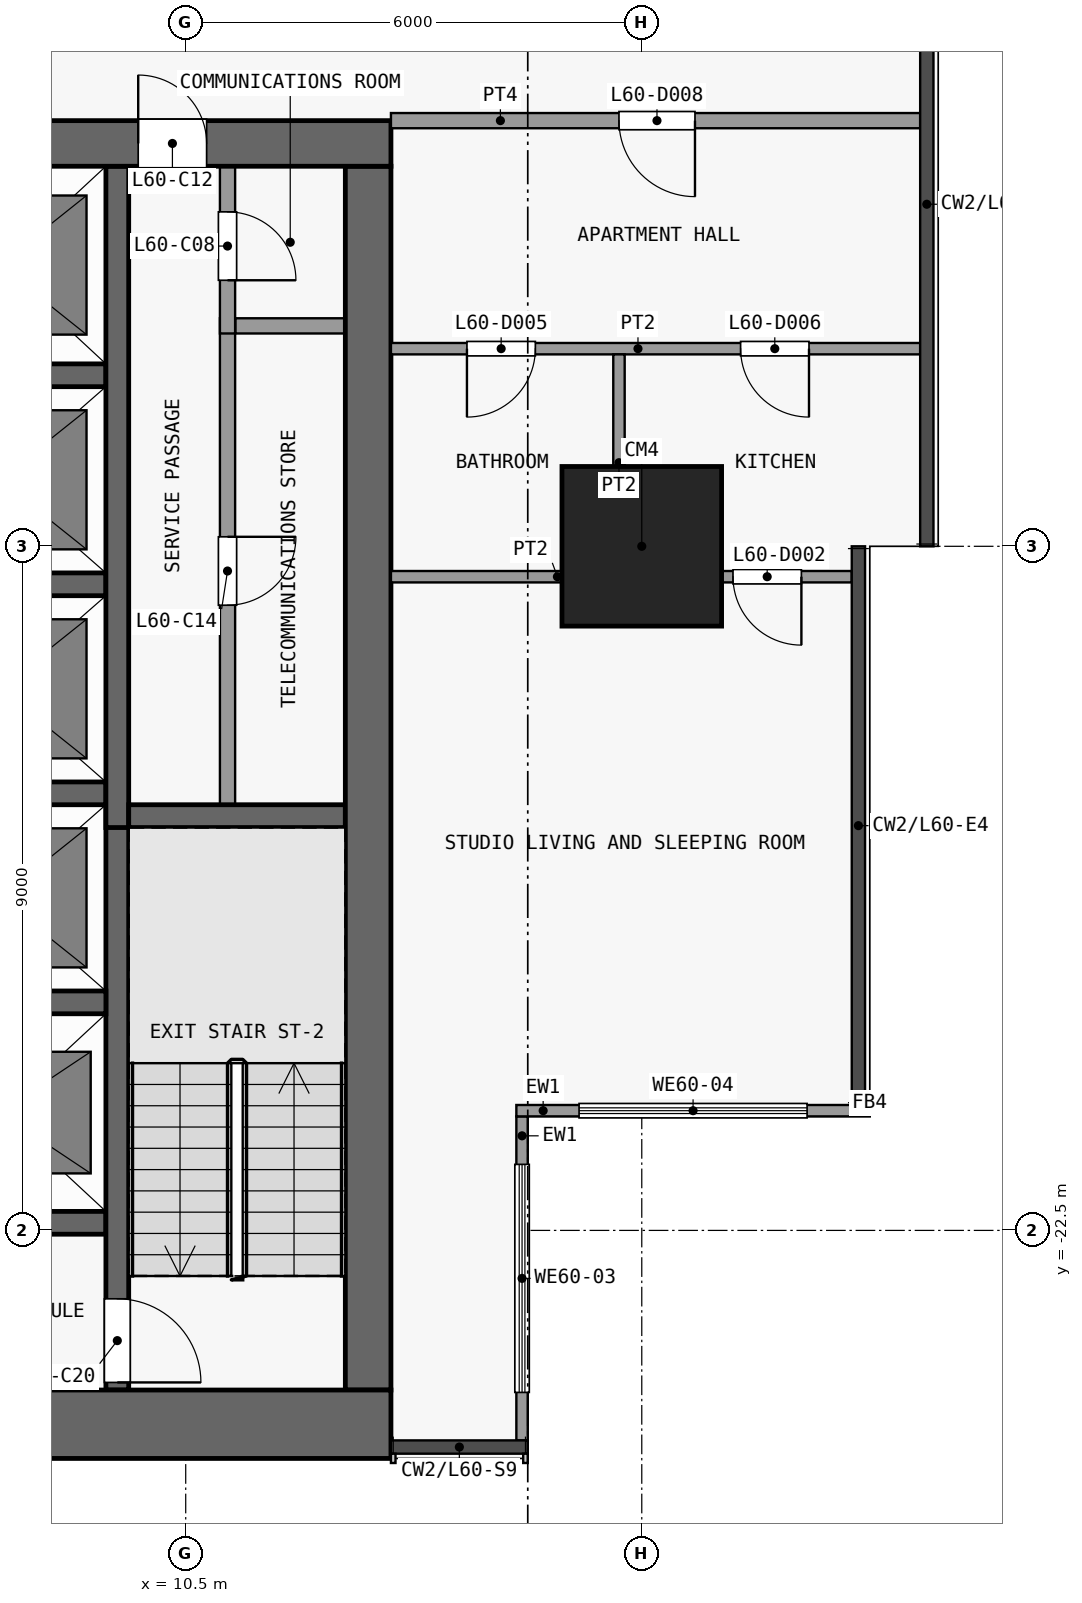
"""IFC4 building model, lengths in metres.
Left out: names, types, materials, properties, quantities, classifications, styles, units other than length and angle.
Written with IfcOpenShell. Run it as: python <this file> out.ifc"""

import sys

from ifc_helpers import new_model, si_unit, direction, frame, frame_2d, origin, origin_2d, place, context, subcontext, project, spatial, rectangle, extrude, element, fill, save


model = new_model("IFC4")
c1 = context("Model", 3, precision=1e-05, world=origin(), true_north=direction((0.0, 1.0)))
c2 = subcontext(c1, "Body", "Model", "MODEL_VIEW")
j1 = project(units=[si_unit("LENGTHUNIT", "METRE"), si_unit("PLANEANGLEUNIT", "RADIAN")], contexts=[c1])
p1 = place(None, origin())
s1 = spatial("IfcSite", under=j1, at=p1, CompositionType="ELEMENT")
p2 = place(p1, origin())
s2 = spatial("IfcBuilding", under=s1, at=p2, CompositionType="ELEMENT")
p3 = place(p2, frame((0.0, 0.0, 237.5)))
s3 = spatial("IfcBuildingStorey", under=s2, at=p3, CompositionType="ELEMENT", Elevation=237.5)
p4 = place(p3, frame((16.5, -13.5, 0.0), z_axis=(0.0, 0.0, 1.0), x_axis=(1.0, 0.0, 0.0)))
e1 = element("IfcColumn", 1, at=p4, inside=s3, PredefinedType="COLUMN", context=c2, shape_type="SweptSolid", body=[
    extrude(rectangle(XDim=2.1, YDim=2.1, at=origin_2d()), origin(), (0.0, 0.0, 1.0), 3.6),
])
p5 = place(p3, frame((-13.2, -25.05, 0.0), z_axis=(0.0, 0.0, 1.0), x_axis=(1.0, 0.0, 0.0)))
e2 = element("IfcWall", 2, at=p5, inside=s3, PredefinedType="SHEAR", context=c2, shape_type="SweptSolid", body=[
    extrude(rectangle(XDim=26.4, YDim=0.9, at=frame_2d((13.2, 0.0))), origin(), (0.0, 0.0, 1.0), 3.3),
])
p6 = place(p3, frame((-13.2, -8.2, 0.0), z_axis=(0.0, 0.0, 1.0), x_axis=(1.0, 0.0, 0.0)))
e3 = element("IfcWall", 3, at=p6, inside=s3, PredefinedType="SHEAR", context=c2, shape_type="SweptSolid", body=[
    extrude(rectangle(XDim=26.4, YDim=0.6, at=frame_2d((13.2, 0.0))), origin(), (0.0, 0.0, 1.0), 3.3),
])
p7 = place(p6, frame((7.5, 0.0, 0.0)))
e4 = element("IfcOpeningElement", 4, at=p7, cuts=e3, PredefinedType="OPENING", context=c2, shape_type="SweptSolid", body=[
    extrude(rectangle(XDim=1.8, YDim=2.1, at=frame_2d((0.9, 1.05))), frame((0.0, 0.31, 0.0), z_axis=(0.0, -1.0, 0.0), x_axis=(1.0, 0.0, 0.0)), (0.0, 0.0, 1.0), 0.62),
])
p8 = place(p6, frame((17.1, 0.0, 0.0)))
e5 = element("IfcOpeningElement", 5, at=p8, cuts=e3, PredefinedType="OPENING", context=c2, shape_type="SweptSolid", body=[
    extrude(rectangle(XDim=1.8, YDim=2.1, at=frame_2d((0.9, 1.05))), frame((0.0, 0.31, 0.0), z_axis=(0.0, -1.0, 0.0), x_axis=(1.0, 0.0, 0.0)), (0.0, 0.0, 1.0), 0.62),
])
p9 = place(p6, frame((2.425, 0.0, 0.0)))
e6 = element("IfcOpeningElement", 6, at=p9, cuts=e3, PredefinedType="OPENING", context=c2, shape_type="SweptSolid", body=[
    extrude(rectangle(XDim=0.9, YDim=2.1, at=frame_2d((0.45, 1.05))), frame((0.0, 0.31, 0.0), z_axis=(0.0, -1.0, 0.0), x_axis=(1.0, 0.0, 0.0)), (0.0, 0.0, 1.0), 0.62),
])
p10 = place(p6, frame((23.075, 0.0, 0.0)))
e7 = element("IfcOpeningElement", 7, at=p10, cuts=e3, PredefinedType="OPENING", context=c2, shape_type="SweptSolid", body=[
    extrude(rectangle(XDim=0.9, YDim=2.1, at=frame_2d((0.45, 1.05))), frame((0.0, 0.31, 0.0), z_axis=(0.0, -1.0, 0.0), x_axis=(1.0, 0.0, 0.0)), (0.0, 0.0, 1.0), 0.62),
])
p11 = place(p3, frame((12.9, -24.6, 0.0), z_axis=(0.0, 0.0, 1.0), x_axis=(0.0, 1.0, 0.0)))
e8 = element("IfcWall", 8, at=p11, inside=s3, PredefinedType="SHEAR", context=c2, shape_type="SweptSolid", body=[
    extrude(rectangle(XDim=16.1, YDim=0.6, at=frame_2d((8.05, 0.0))), origin(), (0.0, 0.0, 1.0), 3.3),
])
for number, where, z_axis, x_axis in (
    (9, (6.65, -22.4, 0.0), (0.0, 0.0, 1.0), (1.0, 0.0, 0.0)),
    (10, (6.65, -19.5, 0.0), (0.0, 0.0, 1.0), (1.0, 0.0, 0.0)),
):
    element("IfcWall", number, at=place(p3, frame(where, z_axis=z_axis, x_axis=x_axis)), inside=s3, PredefinedType="SHEAR", context=c2, shape_type="SweptSolid", body=[
        extrude(rectangle(XDim=2.8, YDim=0.3, at=frame_2d((1.4, 0.0))), origin(), (0.0, 0.0, 1.0), 3.3),
    ])
p12 = place(p3, frame((9.75, -17.05, 0.0), z_axis=(0.0, 0.0, 1.0), x_axis=(1.0, 0.0, 0.0)))
e11 = element("IfcWall", 11, at=p12, inside=s3, PredefinedType="SHEAR", context=c2, shape_type="SweptSolid", body=[
    extrude(rectangle(XDim=2.85, YDim=0.3, at=frame_2d((1.425, 0.0))), origin(), (0.0, 0.0, 1.0), 3.3),
])
for number, where, z_axis, x_axis in (
    (12, (6.65, -16.75, 0.0), (0.0, 0.0, 1.0), (1.0, 0.0, 0.0)),
    (13, (6.65, -14.0, 0.0), (0.0, 0.0, 1.0), (1.0, 0.0, 0.0)),
    (14, (6.65, -11.25, 0.0), (0.0, 0.0, 1.0), (1.0, 0.0, 0.0)),
):
    element("IfcWall", number, at=place(p3, frame(where, z_axis=z_axis, x_axis=x_axis)), inside=s3, PredefinedType="SHEAR", context=c2, shape_type="SweptSolid", body=[
        extrude(rectangle(XDim=2.8, YDim=0.3, at=frame_2d((1.4, 0.0))), origin(), (0.0, 0.0, 1.0), 3.3),
    ])
p13 = place(p3, frame((11.15, -10.6, 0.0), z_axis=(0.0, 0.0, 1.0), x_axis=(1.0, 0.0, 0.0)))
e15 = element("IfcWall", 15, at=p13, inside=s3, PredefinedType="PARTITIONING", context=c2, shape_type="SweptSolid", body=[
    extrude(rectangle(XDim=1.45, YDim=0.2, at=frame_2d((0.725, 0.0))), origin(), (0.0, 0.0, 1.0), 3.3),
])
p14 = place(p3, frame((9.6, -16.9, 0.0), z_axis=(0.0, 0.0, 1.0), x_axis=(0.0, -1.0, 0.0)))
e16 = element("IfcWall", 16, at=p14, inside=s3, PredefinedType="SHEAR", context=c2, shape_type="SweptSolid", body=[
    extrude(rectangle(XDim=7.7, YDim=0.3, at=frame_2d((3.85, 0.0))), origin(), (0.0, 0.0, 1.0), 3.3),
])
p15 = place(p14, frame((6.5, 0.0, 0.0)))
e17 = element("IfcOpeningElement", 17, at=p15, cuts=e16, PredefinedType="OPENING", context=c2, shape_type="SweptSolid", body=[
    extrude(rectangle(XDim=1.1, YDim=2.1, at=frame_2d((0.55, 1.05))), frame((0.0, 0.16, 0.0), z_axis=(0.0, -1.0, 0.0), x_axis=(1.0, 0.0, 0.0)), (0.0, 0.0, 1.0), 0.32),
])
p16 = place(p3, frame((9.6, -17.2, 0.0), z_axis=(0.0, 0.0, 1.0), x_axis=(0.0, 1.0, 0.0)))
e18 = element("IfcWall", 18, at=p16, inside=s3, PredefinedType="SHEAR", context=c2, shape_type="SweptSolid", body=[
    extrude(rectangle(XDim=8.7, YDim=0.3, at=frame_2d((4.35, 0.0))), origin(), (0.0, 0.0, 1.0), 3.3),
])
p17 = place(p3, frame((11.05, -10.5, 0.0), z_axis=(0.0, 0.0, 1.0), x_axis=(0.0, -1.0, 0.0)))
e19 = element("IfcWall", 19, at=p17, inside=s3, PredefinedType="PARTITIONING", context=c2, shape_type="SweptSolid", body=[
    extrude(rectangle(XDim=6.4, YDim=0.2, at=frame_2d((3.2, 0.0))), origin(), (0.0, 0.0, 1.0), 3.3),
])
p18 = place(p17, frame((2.875, 0.0, 0.0)))
e20 = element("IfcOpeningElement", 20, at=p18, cuts=e19, PredefinedType="OPENING", context=c2, shape_type="SweptSolid", body=[
    extrude(rectangle(XDim=0.9, YDim=2.1, at=frame_2d((0.45, 1.05))), frame((0.0, 0.11, 0.0), z_axis=(0.0, -1.0, 0.0), x_axis=(1.0, 0.0, 0.0)), (0.0, 0.0, 1.0), 0.22),
])
p19 = place(p3, frame((11.05, -8.5, 0.0), z_axis=(0.0, 0.0, 1.0), x_axis=(0.0, -1.0, 0.0)))
e21 = element("IfcWall", 21, at=p19, inside=s3, PredefinedType="PARTITIONING", context=c2, shape_type="SweptSolid", body=[
    extrude(rectangle(XDim=2.2, YDim=0.2, at=frame_2d((1.1, 0.0))), origin(), (0.0, 0.0, 1.0), 3.3),
])
p20 = place(p19, frame((0.6, 0.0, 0.0)))
e22 = element("IfcOpeningElement", 22, at=p20, cuts=e21, PredefinedType="OPENING", context=c2, shape_type="SweptSolid", body=[
    extrude(rectangle(XDim=0.9, YDim=2.1, at=frame_2d((0.45, 1.05))), frame((0.0, 0.11, 0.0), z_axis=(0.0, -1.0, 0.0), x_axis=(1.0, 0.0, 0.0)), (0.0, 0.0, 1.0), 0.22),
])
p21 = place(p3, frame((14.925, -21.0, 0.0), z_axis=(0.0, 0.0, 1.0), x_axis=(0.0, -1.0, 0.0)))
e23 = element("IfcWall", 23, at=p21, inside=s3, PredefinedType="SOLIDWALL", context=c2, shape_type="SweptSolid", body=[
    extrude(rectangle(XDim=4.262, YDim=0.15, at=frame_2d((2.131, 0.0))), origin(), (0.0, 0.0, 1.0), 3.3),
])
p22 = place(p21, frame((0.631, 0.0, 0.9)))
e24 = element("IfcOpeningElement", 24, at=p22, cuts=e23, PredefinedType="OPENING", context=c2, shape_type="SweptSolid", body=[
    extrude(rectangle(XDim=3.0, YDim=2.4, at=frame_2d((1.5, 1.2))), frame((0.0, 0.085, 0.0), z_axis=(0.0, -1.0, 0.0), x_axis=(1.0, 0.0, 0.0)), (0.0, 0.0, 1.0), 0.17),
])
p23 = place(p3, frame((19.5, -20.925, 0.0), z_axis=(0.0, 0.0, 1.0), x_axis=(-1.0, 0.0, 0.0)))
e25 = element("IfcWall", 25, at=p23, inside=s3, PredefinedType="SOLIDWALL", context=c2, shape_type="SweptSolid", body=[
    extrude(rectangle(XDim=4.65, YDim=0.15, at=frame_2d((2.325, 0.0))), origin(), (0.0, 0.0, 1.0), 3.3),
])
p24 = place(p23, frame((0.825, 0.0, 0.9)))
e26 = element("IfcOpeningElement", 26, at=p24, cuts=e25, PredefinedType="OPENING", context=c2, shape_type="SweptSolid", body=[
    extrude(rectangle(XDim=3.0, YDim=2.4, at=frame_2d((1.5, 1.2))), frame((0.0, 0.085, 0.0), z_axis=(0.0, -1.0, 0.0), x_axis=(1.0, 0.0, 0.0)), (0.0, 0.0, 1.0), 0.17),
])
p25 = place(p3, frame((13.2, -13.9, 0.0), z_axis=(0.0, 0.0, 1.0), x_axis=(1.0, 0.0, 0.0)))
e27 = element("IfcWall", 27, at=p25, inside=s3, PredefinedType="PARTITIONING", context=c2, shape_type="SweptSolid", body=[
    extrude(rectangle(XDim=6.062, YDim=0.15, at=frame_2d((3.031, 0.0))), origin(), (0.0, 0.0, 1.0), 3.3),
])
p26 = place(p25, frame((4.5, 0.0, 0.0)))
e28 = element("IfcOpeningElement", 28, at=p26, cuts=e27, PredefinedType="OPENING", context=c2, shape_type="SweptSolid", body=[
    extrude(rectangle(XDim=0.9, YDim=2.1, at=frame_2d((0.45, 1.05))), frame((0.0, 0.085, 0.0), z_axis=(0.0, -1.0, 0.0), x_axis=(1.0, 0.0, 0.0)), (0.0, 0.0, 1.0), 0.17),
])
p27 = place(p3, frame((13.2, -10.9, 0.0), z_axis=(0.0, 0.0, 1.0), x_axis=(1.0, 0.0, 0.0)))
e29 = element("IfcWall", 29, at=p27, inside=s3, PredefinedType="PARTITIONING", context=c2, shape_type="SweptSolid", body=[
    extrude(rectangle(XDim=6.963, YDim=0.15, at=frame_2d((3.481, 0.0))), origin(), (0.0, 0.0, 1.0), 3.3),
])
p28 = place(p27, frame((1.0, 0.0, 0.0)))
e30 = element("IfcOpeningElement", 30, at=p28, cuts=e29, PredefinedType="OPENING", context=c2, shape_type="SweptSolid", body=[
    extrude(rectangle(XDim=0.9, YDim=2.1, at=frame_2d((0.45, 1.05))), frame((0.0, 0.085, 0.0), z_axis=(0.0, -1.0, 0.0), x_axis=(1.0, 0.0, 0.0)), (0.0, 0.0, 1.0), 0.17),
])
p29 = place(p27, frame((4.6, 0.0, 0.0)))
e31 = element("IfcOpeningElement", 31, at=p29, cuts=e29, PredefinedType="OPENING", context=c2, shape_type="SweptSolid", body=[
    extrude(rectangle(XDim=0.9, YDim=2.1, at=frame_2d((0.45, 1.05))), frame((0.0, 0.085, 0.0), z_axis=(0.0, -1.0, 0.0), x_axis=(1.0, 0.0, 0.0)), (0.0, 0.0, 1.0), 0.17),
])
p30 = place(p3, frame((13.2, -7.9, 0.0), z_axis=(0.0, 0.0, 1.0), x_axis=(1.0, 0.0, 0.0)))
e32 = element("IfcWall", 32, at=p30, inside=s3, PredefinedType="PARTITIONING", context=c2, shape_type="SweptSolid", body=[
    extrude(rectangle(XDim=6.963, YDim=0.2, at=frame_2d((3.481, 0.0))), origin(), (0.0, 0.0, 1.0), 3.3),
])
p31 = place(p30, frame((3.0, 0.0, 0.0)))
e33 = element("IfcOpeningElement", 33, at=p31, cuts=e32, PredefinedType="OPENING", context=c2, shape_type="SweptSolid", body=[
    extrude(rectangle(XDim=1.0, YDim=2.1, at=frame_2d((0.5, 1.05))), frame((0.0, 0.11, 0.0), z_axis=(0.0, -1.0, 0.0), x_axis=(1.0, 0.0, 0.0)), (0.0, 0.0, 1.0), 0.22),
])
p32 = place(p3, frame((16.2, -13.825, 0.0), z_axis=(0.0, 0.0, 1.0), x_axis=(0.0, 1.0, 0.0)))
e34 = element("IfcWall", 34, at=p32, inside=s3, PredefinedType="PARTITIONING", context=c2, shape_type="SweptSolid", body=[
    extrude(rectangle(XDim=2.85, YDim=0.15, at=frame_2d((1.425, 0.0))), origin(), (0.0, 0.0, 1.0), 3.3),
])
p33 = place(p20, origin())
e35 = element("IfcDoor", 35, at=p33, inside=s3, OperationType="SINGLE_SWING_RIGHT", PredefinedType="DOOR", context=c2, shape_type="SweptSolid", body=[
    extrude(rectangle(XDim=0.9, YDim=2.1, at=frame_2d((0.45, 1.05))), frame((0.0, 0.025, 0.0), z_axis=(0.0, -1.0, 0.0), x_axis=(1.0, 0.0, 0.0)), (0.0, 0.0, 1.0), 0.05),
])
fill(e22, e35)
p34 = place(p10, origin())
e36 = element("IfcDoor", 36, at=p34, inside=s3, OperationType="SINGLE_SWING_LEFT", PredefinedType="DOOR", context=c2, shape_type="SweptSolid", body=[
    extrude(rectangle(XDim=0.9, YDim=2.1, at=frame_2d((0.45, 1.05))), frame((0.0, 0.025, 0.0), z_axis=(0.0, -1.0, 0.0), x_axis=(1.0, 0.0, 0.0)), (0.0, 0.0, 1.0), 0.05),
])
fill(e7, e36)
p35 = place(p18, origin())
e37 = element("IfcDoor", 37, at=p35, inside=s3, OperationType="SINGLE_SWING_LEFT", PredefinedType="DOOR", context=c2, shape_type="SweptSolid", body=[
    extrude(rectangle(XDim=0.9, YDim=2.1, at=frame_2d((0.45, 1.05))), frame((0.0, 0.025, 0.0), z_axis=(0.0, -1.0, 0.0), x_axis=(1.0, 0.0, 0.0)), (0.0, 0.0, 1.0), 0.05),
])
fill(e20, e37)
p36 = place(p15, origin())
e38 = element("IfcDoor", 38, at=p36, inside=s3, OperationType="SINGLE_SWING_RIGHT", PredefinedType="DOOR", context=c2, shape_type="SweptSolid", body=[
    extrude(rectangle(XDim=1.1, YDim=2.1, at=frame_2d((0.55, 1.05))), frame((0.0, 0.025, 0.0), z_axis=(0.0, -1.0, 0.0), x_axis=(1.0, 0.0, 0.0)), (0.0, 0.0, 1.0), 0.05),
])
fill(e17, e38)
p37 = place(p22, origin())
e39 = element("IfcWindow", 39, at=p37, inside=s3, PartitioningType="SINGLE_PANEL", PredefinedType="WINDOW", context=c2, shape_type="SweptSolid", body=[
    extrude(rectangle(XDim=3.0, YDim=2.4, at=frame_2d((1.5, 1.2))), frame((0.0, 0.03, 0.0), z_axis=(0.0, -1.0, 0.0), x_axis=(1.0, 0.0, 0.0)), (0.0, 0.0, 1.0), 0.06),
])
fill(e24, e39)
p38 = place(p24, origin())
e40 = element("IfcWindow", 40, at=p38, inside=s3, PartitioningType="SINGLE_PANEL", PredefinedType="WINDOW", context=c2, shape_type="SweptSolid", body=[
    extrude(rectangle(XDim=3.0, YDim=2.4, at=frame_2d((1.5, 1.2))), frame((0.0, 0.03, 0.0), z_axis=(0.0, -1.0, 0.0), x_axis=(1.0, 0.0, 0.0)), (0.0, 0.0, 1.0), 0.06),
])
fill(e26, e40)
p39 = place(p26, origin())
e41 = element("IfcDoor", 41, at=p39, inside=s3, OperationType="SINGLE_SWING_RIGHT", PredefinedType="DOOR", context=c2, shape_type="SweptSolid", body=[
    extrude(rectangle(XDim=0.9, YDim=2.1, at=frame_2d((0.45, 1.05))), frame((0.0, 0.025, 0.0), z_axis=(0.0, -1.0, 0.0), x_axis=(1.0, 0.0, 0.0)), (0.0, 0.0, 1.0), 0.05),
])
fill(e28, e41)
p40 = place(p28, origin())
e42 = element("IfcDoor", 42, at=p40, inside=s3, OperationType="SINGLE_SWING_LEFT", PredefinedType="DOOR", context=c2, shape_type="SweptSolid", body=[
    extrude(rectangle(XDim=0.9, YDim=2.1, at=frame_2d((0.45, 1.05))), frame((0.0, 0.025, 0.0), z_axis=(0.0, -1.0, 0.0), x_axis=(1.0, 0.0, 0.0)), (0.0, 0.0, 1.0), 0.05),
])
fill(e30, e42)
p41 = place(p29, origin())
e43 = element("IfcDoor", 43, at=p41, inside=s3, OperationType="SINGLE_SWING_RIGHT", PredefinedType="DOOR", context=c2, shape_type="SweptSolid", body=[
    extrude(rectangle(XDim=0.9, YDim=2.1, at=frame_2d((0.45, 1.05))), frame((0.0, 0.025, 0.0), z_axis=(0.0, -1.0, 0.0), x_axis=(1.0, 0.0, 0.0)), (0.0, 0.0, 1.0), 0.05),
])
fill(e31, e43)
p42 = place(p31, origin())
e44 = element("IfcDoor", 44, at=p42, inside=s3, OperationType="SINGLE_SWING_RIGHT", PredefinedType="DOOR", context=c2, shape_type="SweptSolid", body=[
    extrude(rectangle(XDim=1.0, YDim=2.1, at=frame_2d((0.5, 1.05))), frame((0.0, 0.025, 0.0), z_axis=(0.0, -1.0, 0.0), x_axis=(1.0, 0.0, 0.0)), (0.0, 0.0, 1.0), 0.05),
])
fill(e33, e44)
save(model, sys.argv[1])
